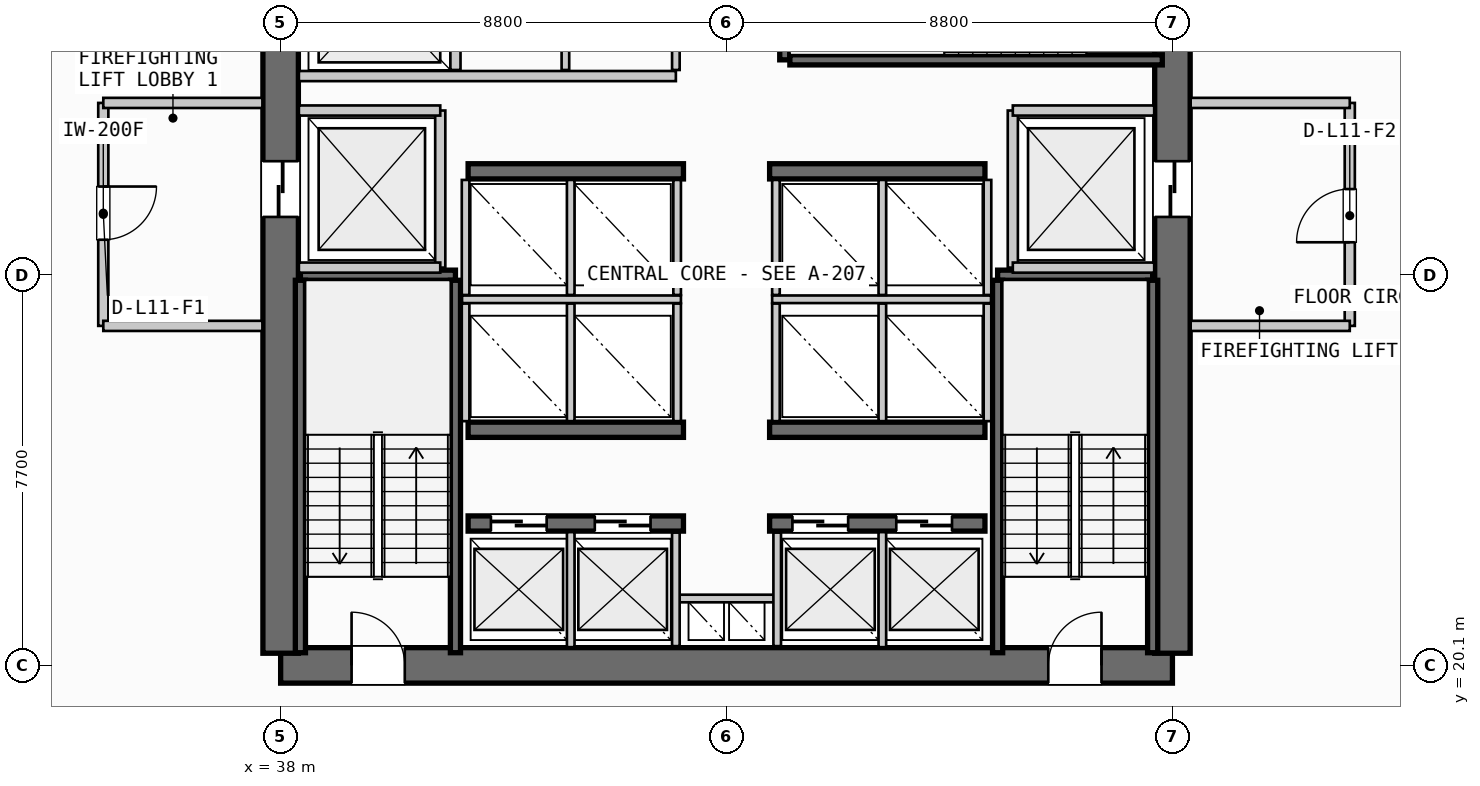
"""IFC4 building model, lengths in metres.
Left out: names, types, materials, properties, quantities, classifications, styles, units other than length and angle.
Written with IfcOpenShell. Run it as: python <this file> out.ifc"""

import sys

from ifc_helpers import new_model, si_unit, direction, frame, frame_2d, origin, place, context, subcontext, project, spatial, rectangle, extrude, source, transform, mapped, element, fill, save


model = new_model("IFC4")
c1 = context("Model", 3, precision=1e-05, world=origin(), true_north=direction((0.0, 1.0)))
c2 = subcontext(c1, "Body", "Model", "MODEL_VIEW")
j1 = project(units=[si_unit("LENGTHUNIT", "METRE"), si_unit("PLANEANGLEUNIT", "RADIAN")], contexts=[c1])
p1 = place(None, origin())
s1 = spatial("IfcSite", under=j1, at=p1, CompositionType="ELEMENT")
p2 = place(p1, origin())
s2 = spatial("IfcBuilding", under=s1, at=p2, CompositionType="ELEMENT")
p3 = place(p2, frame((0.0, 0.0, 48.6)))
s3 = spatial("IfcBuildingStorey", under=s2, at=p3, CompositionType="ELEMENT", Elevation=48.6)
p4 = place(p3, frame((38.0, 20.1, 0.0), z_axis=(0.0, 0.0, 1.0), x_axis=(1.0, 0.0, 0.0)))
e1 = element("IfcWall", 1, at=p4, inside=s3, PredefinedType="SHEAR", context=c2, shape_type="SweptSolid", body=[
    extrude(rectangle(XDim=17.6, YDim=0.7, at=frame_2d((8.8, 0.0))), origin(), (0.0, 0.0, 1.0), 3.55),
])
p5 = place(p4, frame((1.4, 0.0, 0.0)))
e2 = element("IfcOpeningElement", 2, at=p5, cuts=e1, PredefinedType="OPENING", context=c2, shape_type="SweptSolid", body=[
    extrude(rectangle(XDim=1.05, YDim=2.15, at=frame_2d((0.525, 1.075))), frame((0.0, 0.36, 0.0), z_axis=(0.0, -1.0, 0.0), x_axis=(1.0, 0.0, 0.0)), (0.0, 0.0, 1.0), 0.72),
])
p6 = place(p4, frame((15.15, 0.0, 0.0)))
e3 = element("IfcOpeningElement", 3, at=p6, cuts=e1, PredefinedType="OPENING", context=c2, shape_type="SweptSolid", body=[
    extrude(rectangle(XDim=1.05, YDim=2.15, at=frame_2d((0.525, 1.075))), frame((0.0, 0.36, 0.0), z_axis=(0.0, -1.0, 0.0), x_axis=(1.0, 0.0, 0.0)), (0.0, 0.0, 1.0), 0.72),
])
p7 = place(p3, frame((38.0, 35.26, 0.0), z_axis=(0.0, 0.0, 1.0), x_axis=(0.0, -1.0, 0.0)))
e4 = element("IfcWall", 4, at=p7, inside=s3, PredefinedType="SHEAR", context=c2, shape_type="SweptSolid", body=[
    extrude(rectangle(XDim=14.92, YDim=0.7, at=frame_2d((7.46, 0.0))), origin(), (0.0, 0.0, 1.0), 3.55),
])
p8 = place(p7, frame((5.21, 0.0, 0.0)))
e5 = element("IfcOpeningElement", 5, at=p8, cuts=e4, PredefinedType="OPENING", context=c2, shape_type="SweptSolid", body=[
    extrude(rectangle(XDim=1.1, YDim=2.2, at=frame_2d((0.55, 1.1))), frame((0.0, 0.36, 0.0), z_axis=(0.0, -1.0, 0.0), x_axis=(1.0, 0.0, 0.0)), (0.0, 0.0, 1.0), 0.72),
])
p9 = place(p3, frame((55.6, 20.34, 0.0), z_axis=(0.0, 0.0, 1.0), x_axis=(0.0, 1.0, 0.0)))
e6 = element("IfcWall", 6, at=p9, inside=s3, PredefinedType="SHEAR", context=c2, shape_type="SweptSolid", body=[
    extrude(rectangle(XDim=14.92, YDim=0.7, at=frame_2d((7.46, 0.0))), origin(), (0.0, 0.0, 1.0), 3.55),
])
p10 = place(p9, frame((12.71, 0.0, 0.0)))
e7 = element("IfcOpeningElement", 7, at=p10, cuts=e6, PredefinedType="OPENING", context=c2, shape_type="SweptSolid", body=[
    extrude(rectangle(XDim=1.05, YDim=2.15, at=frame_2d((0.525, 1.075))), frame((0.0, 0.36, 0.0), z_axis=(0.0, -1.0, 0.0), x_axis=(1.0, 0.0, 0.0)), (0.0, 0.0, 1.0), 0.72),
])
p11 = place(p9, frame((8.61, 0.0, 0.0)))
e8 = element("IfcOpeningElement", 8, at=p11, cuts=e6, PredefinedType="OPENING", context=c2, shape_type="SweptSolid", body=[
    extrude(rectangle(XDim=1.1, YDim=2.2, at=frame_2d((0.55, 1.1))), frame((0.0, 0.36, 0.0), z_axis=(0.0, -1.0, 0.0), x_axis=(1.0, 0.0, 0.0)), (0.0, 0.0, 1.0), 0.72),
])
p12 = place(p3, frame((41.7, 22.9, 0.0), z_axis=(0.0, 0.0, 1.0), x_axis=(1.0, 0.0, 0.0)))
e9 = element("IfcWall", 9, at=p12, inside=s3, PredefinedType="SHEAR", context=c2, shape_type="SweptSolid", body=[
    extrude(rectangle(XDim=4.25, YDim=0.3, at=frame_2d((2.125, 0.0))), origin(), (0.0, 0.0, 1.0), 3.55),
])
p13 = place(p12, frame((0.45, 0.0, 0.0)))
e10 = element("IfcOpeningElement", 10, at=p13, cuts=e9, PredefinedType="OPENING", context=c2, shape_type="SweptSolid", body=[
    extrude(rectangle(XDim=1.1, YDim=2.2, at=frame_2d((0.55, 1.1))), frame((0.0, 0.16, 0.0), z_axis=(0.0, -1.0, 0.0), x_axis=(1.0, 0.0, 0.0)), (0.0, 0.0, 1.0), 0.32),
])
p14 = place(p12, frame((2.5, 0.0, 0.0)))
e11 = element("IfcOpeningElement", 11, at=p14, cuts=e9, PredefinedType="OPENING", context=c2, shape_type="SweptSolid", body=[
    extrude(rectangle(XDim=1.1, YDim=2.2, at=frame_2d((0.55, 1.1))), frame((0.0, 0.16, 0.0), z_axis=(0.0, -1.0, 0.0), x_axis=(1.0, 0.0, 0.0)), (0.0, 0.0, 1.0), 0.32),
])
p15 = place(p3, frame((47.65, 22.9, 0.0), z_axis=(0.0, 0.0, 1.0), x_axis=(1.0, 0.0, 0.0)))
e12 = element("IfcWall", 12, at=p15, inside=s3, PredefinedType="SHEAR", context=c2, shape_type="SweptSolid", body=[
    extrude(rectangle(XDim=4.25, YDim=0.3, at=frame_2d((2.125, 0.0))), origin(), (0.0, 0.0, 1.0), 3.55),
])
p16 = place(p15, frame((0.45, 0.0, 0.0)))
e13 = element("IfcOpeningElement", 13, at=p16, cuts=e12, PredefinedType="OPENING", context=c2, shape_type="SweptSolid", body=[
    extrude(rectangle(XDim=1.1, YDim=2.2, at=frame_2d((0.55, 1.1))), frame((0.0, 0.16, 0.0), z_axis=(0.0, -1.0, 0.0), x_axis=(1.0, 0.0, 0.0)), (0.0, 0.0, 1.0), 0.32),
])
p17 = place(p15, frame((2.5, 0.0, 0.0)))
e14 = element("IfcOpeningElement", 14, at=p17, cuts=e12, PredefinedType="OPENING", context=c2, shape_type="SweptSolid", body=[
    extrude(rectangle(XDim=1.1, YDim=2.2, at=frame_2d((0.55, 1.1))), frame((0.0, 0.16, 0.0), z_axis=(0.0, -1.0, 0.0), x_axis=(1.0, 0.0, 0.0)), (0.0, 0.0, 1.0), 0.32),
])
for number, where, z_axis, x_axis in (
    (15, (41.7, 24.75, 0.0), (0.0, 0.0, 1.0), (1.0, 0.0, 0.0)),
    (16, (47.65, 24.75, 0.0), (0.0, 0.0, 1.0), (1.0, 0.0, 0.0)),
    (17, (41.7, 29.85, 0.0), (0.0, 0.0, 1.0), (1.0, 0.0, 0.0)),
    (18, (47.65, 29.85, 0.0), (0.0, 0.0, 1.0), (1.0, 0.0, 0.0)),
):
    element("IfcWall", number, at=place(p3, frame(where, z_axis=z_axis, x_axis=x_axis)), inside=s3, PredefinedType="SHEAR", context=c2, shape_type="SweptSolid", body=[
        extrude(rectangle(XDim=4.25, YDim=0.3, at=frame_2d((2.125, 0.0))), origin(), (0.0, 0.0, 1.0), 3.55),
    ])
p18 = place(p3, frame((38.39, 27.8, 0.0), z_axis=(0.0, 0.0, 1.0), x_axis=(1.0, 0.0, 0.0)))
e19 = element("IfcWall", 19, at=p18, inside=s3, PredefinedType="SHEAR", context=c2, shape_type="SweptSolid", body=[
    extrude(rectangle(XDim=3.06, YDim=0.2, at=frame_2d((1.53, 0.0))), origin(), (0.0, 0.0, 1.0), 3.55),
])
for number, where, z_axis, x_axis in (
    (20, (41.45, 27.7, 0.0), (0.0, 0.0, 1.0), (0.0, -1.0, 0.0)),
    (21, (38.39, 20.35, 0.0), (0.0, 0.0, 1.0), (0.0, 1.0, 0.0)),
):
    element("IfcWall", number, at=place(p3, frame(where, z_axis=z_axis, x_axis=x_axis)), inside=s3, PredefinedType="SHEAR", context=c2, shape_type="SweptSolid", body=[
        extrude(rectangle(XDim=7.35, YDim=0.2, at=frame_2d((3.675, 0.0))), origin(), (0.0, 0.0, 1.0), 3.55),
    ])
p19 = place(p3, frame((52.15, 27.8, 0.0), z_axis=(0.0, 0.0, 1.0), x_axis=(1.0, 0.0, 0.0)))
e22 = element("IfcWall", 22, at=p19, inside=s3, PredefinedType="SHEAR", context=c2, shape_type="SweptSolid", body=[
    extrude(rectangle(XDim=3.06, YDim=0.2, at=frame_2d((1.53, 0.0))), origin(), (0.0, 0.0, 1.0), 3.55),
])
for number, where, z_axis, x_axis in (
    (23, (55.21, 27.7, 0.0), (0.0, 0.0, 1.0), (0.0, -1.0, 0.0)),
    (24, (52.15, 20.35, 0.0), (0.0, 0.0, 1.0), (0.0, 1.0, 0.0)),
):
    element("IfcWall", number, at=place(p3, frame(where, z_axis=z_axis, x_axis=x_axis)), inside=s3, PredefinedType="SHEAR", context=c2, shape_type="SweptSolid", body=[
        extrude(rectangle(XDim=7.35, YDim=0.2, at=frame_2d((3.675, 0.0))), origin(), (0.0, 0.0, 1.0), 3.55),
    ])
p20 = place(p3, frame((47.95, 32.05, 0.0), z_axis=(0.0, 0.0, 1.0), x_axis=(0.0, 1.0, 0.0)))
e25 = element("IfcWall", 25, at=p20, inside=s3, PredefinedType="SHEAR", context=c2, shape_type="SweptSolid", body=[
    extrude(rectangle(XDim=3.06, YDim=0.2, at=frame_2d((1.53, 0.0))), origin(), (0.0, 0.0, 1.0), 3.55),
])
p21 = place(p3, frame((55.4, 32.05, 0.0), z_axis=(0.0, 0.0, 1.0), x_axis=(-1.0, 0.0, 0.0)))
e26 = element("IfcWall", 26, at=p21, inside=s3, PredefinedType="SHEAR", context=c2, shape_type="SweptSolid", body=[
    extrude(rectangle(XDim=7.35, YDim=0.2, at=frame_2d((3.675, 0.0))), origin(), (0.0, 0.0, 1.0), 3.55),
])
p22 = place(p3, frame((45.8, 21.42, 0.0), z_axis=(0.0, 0.0, 1.0), x_axis=(1.0, 0.0, 0.0)))
e27 = element("IfcWall", 27, at=p22, inside=s3, PredefinedType="PARTITIONING", context=c2, shape_type="SweptSolid", body=[
    extrude(rectangle(XDim=2.0, YDim=0.15, at=frame_2d((1.0, 0.0))), origin(), (0.0, 0.0, 1.0), 2.785),
])
for number, where, z_axis, x_axis in (
    (28, (45.8, 20.48, 0.0), (0.0, 0.0, 1.0), (0.0, 1.0, 0.0)),
    (29, (47.8, 20.48, 0.0), (0.0, 0.0, 1.0), (0.0, 1.0, 0.0)),
):
    element("IfcWall", number, at=place(p3, frame(where, z_axis=z_axis, x_axis=x_axis)), inside=s3, PredefinedType="PARTITIONING", context=c2, shape_type="SweptSolid", body=[
        extrude(rectangle(XDim=2.24, YDim=0.15, at=frame_2d((1.12, 0.0))), origin(), (0.0, 0.0, 1.0), 2.785),
    ])
p23 = place(p3, frame((41.15, 27.95, 0.0), z_axis=(0.0, 0.0, 1.0), x_axis=(0.0, 1.0, 0.0)))
e30 = element("IfcWall", 30, at=p23, inside=s3, PredefinedType="PARTITIONING", context=c2, shape_type="SweptSolid", body=[
    extrude(rectangle(XDim=3.1, YDim=0.2, at=frame_2d((1.55, 0.0))), origin(), (0.0, 0.0, 1.0), 2.785),
])
for number, where, z_axis, x_axis in (
    (31, (38.36, 27.95, 0.0), (0.0, 0.0, 1.0), (1.0, 0.0, 0.0)),
    (32, (38.36, 31.05, 0.0), (0.0, 0.0, 1.0), (1.0, 0.0, 0.0)),
):
    element("IfcWall", number, at=place(p3, frame(where, z_axis=z_axis, x_axis=x_axis)), inside=s3, PredefinedType="PARTITIONING", context=c2, shape_type="SweptSolid", body=[
        extrude(rectangle(XDim=2.79, YDim=0.2, at=frame_2d((1.395, 0.0))), origin(), (0.0, 0.0, 1.0), 2.785),
    ])
p24 = place(p3, frame((34.5, 31.2, 0.0), z_axis=(0.0, 0.0, 1.0), x_axis=(0.0, -1.0, 0.0)))
e33 = element("IfcWall", 33, at=p24, inside=s3, PredefinedType="PARTITIONING", context=c2, shape_type="SweptSolid", body=[
    extrude(rectangle(XDim=4.4, YDim=0.2, at=frame_2d((2.2, 0.0))), origin(), (0.0, 0.0, 1.0), 2.785),
])
p25 = place(p24, frame((1.65, 0.0, 0.0)))
e34 = element("IfcOpeningElement", 34, at=p25, cuts=e33, PredefinedType="OPENING", context=c2, shape_type="SweptSolid", body=[
    extrude(rectangle(XDim=1.05, YDim=2.15, at=frame_2d((0.525, 1.075))), frame((0.0, 0.11, 0.0), z_axis=(0.0, -1.0, 0.0), x_axis=(1.0, 0.0, 0.0)), (0.0, 0.0, 1.0), 0.22),
])
for number, where, z_axis, x_axis in (
    (35, (34.5, 26.8, 0.0), (0.0, 0.0, 1.0), (1.0, 0.0, 0.0)),
    (36, (34.5, 31.2, 0.0), (0.0, 0.0, 1.0), (1.0, 0.0, 0.0)),
):
    element("IfcWall", number, at=place(p3, frame(where, z_axis=z_axis, x_axis=x_axis)), inside=s3, PredefinedType="PARTITIONING", context=c2, shape_type="SweptSolid", body=[
        extrude(rectangle(XDim=3.14, YDim=0.2, at=frame_2d((1.57, 0.0))), origin(), (0.0, 0.0, 1.0), 2.785),
    ])
p26 = place(p3, frame((52.45, 27.95, 0.0), z_axis=(0.0, 0.0, 1.0), x_axis=(0.0, 1.0, 0.0)))
e37 = element("IfcWall", 37, at=p26, inside=s3, PredefinedType="PARTITIONING", context=c2, shape_type="SweptSolid", body=[
    extrude(rectangle(XDim=3.1, YDim=0.2, at=frame_2d((1.55, 0.0))), origin(), (0.0, 0.0, 1.0), 2.785),
])
for number, where, z_axis, x_axis in (
    (38, (52.45, 27.95, 0.0), (0.0, 0.0, 1.0), (1.0, 0.0, 0.0)),
    (39, (52.45, 31.05, 0.0), (0.0, 0.0, 1.0), (1.0, 0.0, 0.0)),
):
    element("IfcWall", number, at=place(p3, frame(where, z_axis=z_axis, x_axis=x_axis)), inside=s3, PredefinedType="PARTITIONING", context=c2, shape_type="SweptSolid", body=[
        extrude(rectangle(XDim=2.79, YDim=0.2, at=frame_2d((1.395, 0.0))), origin(), (0.0, 0.0, 1.0), 2.785),
    ])
p27 = place(p3, frame((59.1, 26.8, 0.0), z_axis=(0.0, 0.0, 1.0), x_axis=(0.0, 1.0, 0.0)))
e40 = element("IfcWall", 40, at=p27, inside=s3, PredefinedType="PARTITIONING", context=c2, shape_type="SweptSolid", body=[
    extrude(rectangle(XDim=4.4, YDim=0.2, at=frame_2d((2.2, 0.0))), origin(), (0.0, 0.0, 1.0), 2.785),
])
p28 = place(p27, frame((1.65, 0.0, 0.0)))
e41 = element("IfcOpeningElement", 41, at=p28, cuts=e40, PredefinedType="OPENING", context=c2, shape_type="SweptSolid", body=[
    extrude(rectangle(XDim=1.05, YDim=2.15, at=frame_2d((0.525, 1.075))), frame((0.0, 0.11, 0.0), z_axis=(0.0, -1.0, 0.0), x_axis=(1.0, 0.0, 0.0)), (0.0, 0.0, 1.0), 0.22),
])
for number, where, z_axis, x_axis in (
    (42, (55.96, 26.8, 0.0), (0.0, 0.0, 1.0), (1.0, 0.0, 0.0)),
    (43, (55.96, 31.2, 0.0), (0.0, 0.0, 1.0), (1.0, 0.0, 0.0)),
):
    element("IfcWall", number, at=place(p3, frame(where, z_axis=z_axis, x_axis=x_axis)), inside=s3, PredefinedType="PARTITIONING", context=c2, shape_type="SweptSolid", body=[
        extrude(rectangle(XDim=3.14, YDim=0.2, at=frame_2d((1.57, 0.0))), origin(), (0.0, 0.0, 1.0), 2.785),
    ])
for number, where, z_axis, x_axis in (
    (44, (43.725, 20.46, 0.0), (0.0, 0.0, 1.0), (0.0, 1.0, 0.0)),
    (45, (49.875, 20.46, 0.0), (0.0, 0.0, 1.0), (0.0, 1.0, 0.0)),
):
    element("IfcWall", number, at=place(p3, frame(where, z_axis=z_axis, x_axis=x_axis)), inside=s3, PredefinedType="PARTITIONING", context=c2, shape_type="SweptSolid", body=[
        extrude(rectangle(XDim=2.27, YDim=0.15, at=frame_2d((1.135, 0.0))), origin(), (0.0, 0.0, 1.0), 2.785),
    ])
p29 = place(p3, frame((41.58, 27.325, 0.0), z_axis=(0.0, 0.0, 1.0), x_axis=(1.0, 0.0, 0.0)))
e46 = element("IfcWall", 46, at=p29, inside=s3, PredefinedType="PARTITIONING", context=c2, shape_type="SweptSolid", body=[
    extrude(rectangle(XDim=4.32, YDim=0.15, at=frame_2d((2.16, 0.0))), origin(), (0.0, 0.0, 1.0), 2.785),
])
p30 = place(p3, frame((47.7, 27.325, 0.0), z_axis=(0.0, 0.0, 1.0), x_axis=(1.0, 0.0, 0.0)))
e47 = element("IfcWall", 47, at=p30, inside=s3, PredefinedType="PARTITIONING", context=c2, shape_type="SweptSolid", body=[
    extrude(rectangle(XDim=4.32, YDim=0.15, at=frame_2d((2.16, 0.0))), origin(), (0.0, 0.0, 1.0), 2.785),
])
for number, where, z_axis, x_axis in (
    (48, (41.65, 24.92, 0.0), (0.0, 0.0, 1.0), (0.0, 1.0, 0.0)),
    (49, (43.725, 24.92, 0.0), (0.0, 0.0, 1.0), (0.0, 1.0, 0.0)),
    (50, (45.825, 24.92, 0.0), (0.0, 0.0, 1.0), (0.0, 1.0, 0.0)),
    (51, (47.775, 24.92, 0.0), (0.0, 0.0, 1.0), (0.0, 1.0, 0.0)),
    (52, (49.875, 24.92, 0.0), (0.0, 0.0, 1.0), (0.0, 1.0, 0.0)),
    (53, (51.95, 24.92, 0.0), (0.0, 0.0, 1.0), (0.0, 1.0, 0.0)),
):
    element("IfcWall", number, at=place(p3, frame(where, z_axis=z_axis, x_axis=x_axis)), inside=s3, PredefinedType="PARTITIONING", context=c2, shape_type="SweptSolid", body=[
        extrude(rectangle(XDim=2.32, YDim=0.15, at=frame_2d((1.16, 0.0))), origin(), (0.0, 0.0, 1.0), 2.785),
    ])
for number, where, z_axis, x_axis in (
    (54, (41.65, 27.41, 0.0), (0.0, 0.0, 1.0), (0.0, 1.0, 0.0)),
    (55, (43.725, 27.41, 0.0), (0.0, 0.0, 1.0), (0.0, 1.0, 0.0)),
    (56, (45.825, 27.41, 0.0), (0.0, 0.0, 1.0), (0.0, 1.0, 0.0)),
    (57, (47.775, 27.41, 0.0), (0.0, 0.0, 1.0), (0.0, 1.0, 0.0)),
    (58, (49.875, 27.41, 0.0), (0.0, 0.0, 1.0), (0.0, 1.0, 0.0)),
    (59, (51.95, 27.41, 0.0), (0.0, 0.0, 1.0), (0.0, 1.0, 0.0)),
):
    element("IfcWall", number, at=place(p3, frame(where, z_axis=z_axis, x_axis=x_axis)), inside=s3, PredefinedType="PARTITIONING", context=c2, shape_type="SweptSolid", body=[
        extrude(rectangle(XDim=2.27, YDim=0.15, at=frame_2d((1.135, 0.0))), origin(), (0.0, 0.0, 1.0), 2.785),
    ])
p31 = place(p3, frame((41.45, 31.85, 0.0), z_axis=(0.0, 0.0, 1.0), x_axis=(0.0, 1.0, 0.0)))
e60 = element("IfcWall", 60, at=p31, inside=s3, PredefinedType="PARTITIONING", context=c2, shape_type="SweptSolid", body=[
    extrude(rectangle(XDim=3.29, YDim=0.2, at=frame_2d((1.645, 0.0))), origin(), (0.0, 0.0, 1.0), 2.785),
])
p32 = place(p3, frame((38.36, 31.73, 0.0), z_axis=(0.0, 0.0, 1.0), x_axis=(1.0, 0.0, 0.0)))
e61 = element("IfcWall", 61, at=p32, inside=s3, PredefinedType="PARTITIONING", context=c2, shape_type="SweptSolid", body=[
    extrude(rectangle(XDim=7.44, YDim=0.2, at=frame_2d((3.72, 0.0))), origin(), (0.0, 0.0, 1.0), 2.785),
])
p33 = place(p3, frame((45.8, 31.85, 0.0), z_axis=(0.0, 0.0, 1.0), x_axis=(0.0, 1.0, 0.0)))
e62 = element("IfcWall", 62, at=p33, inside=s3, PredefinedType="PARTITIONING", context=c2, shape_type="SweptSolid", body=[
    extrude(rectangle(XDim=3.29, YDim=0.15, at=frame_2d((1.645, 0.0))), origin(), (0.0, 0.0, 1.0), 2.785),
])
p34 = place(p3, frame((43.62, 31.85, 0.0), z_axis=(0.0, 0.0, 1.0), x_axis=(0.0, 1.0, 0.0)))
e63 = element("IfcWall", 63, at=p34, inside=s3, PredefinedType="PLUMBINGWALL", context=c2, shape_type="SweptSolid", body=[
    extrude(rectangle(XDim=3.29, YDim=0.15, at=frame_2d((1.645, 0.0))), origin(), (0.0, 0.0, 1.0), 2.785),
])
m1 = source(origin(), c2, "Body", "SweptSolid", [
    extrude(rectangle(XDim=1.05, YDim=2.15, at=frame_2d((0.525, 1.075))), frame((0.0, 0.025, 0.0), z_axis=(0.0, -1.0, 0.0), x_axis=(1.0, 0.0, 0.0)), (0.0, 0.0, 1.0), 0.05),
])
p35 = place(p5, origin())
e64 = element("IfcDoor", 64, at=p35, inside=s3, OperationType="SINGLE_SWING_LEFT", PredefinedType="DOOR", context=c2, shape_type="MappedRepresentation", body=[
    mapped(m1, transform((0.0, 0.0, 0.0), scale=1.0)),
])
fill(e2, e64)
p36 = place(p6, origin())
e65 = element("IfcDoor", 65, at=p36, inside=s3, OperationType="SINGLE_SWING_RIGHT", PredefinedType="DOOR", context=c2, shape_type="MappedRepresentation", body=[
    mapped(m1, transform((0.0, 0.0, 0.0), scale=1.0)),
])
fill(e3, e65)
m2 = source(origin(), c2, "Body", "SweptSolid", [
    extrude(rectangle(XDim=1.1, YDim=2.2, at=frame_2d((0.55, 1.1))), frame((0.0, 0.025, 0.0), z_axis=(0.0, -1.0, 0.0), x_axis=(1.0, 0.0, 0.0)), (0.0, 0.0, 1.0), 0.05),
])
p37 = place(p8, origin())
e66 = element("IfcDoor", 66, at=p37, inside=s3, OperationType="SLIDING_TO_LEFT", PredefinedType="DOOR", context=c2, shape_type="MappedRepresentation", body=[
    mapped(m2, transform((0.0, 0.0, 0.0), scale=1.0)),
])
fill(e5, e66)
p38 = place(p11, origin())
e67 = element("IfcDoor", 67, at=p38, inside=s3, OperationType="SLIDING_TO_RIGHT", PredefinedType="DOOR", context=c2, shape_type="MappedRepresentation", body=[
    mapped(m2, transform((0.0, 0.0, 0.0), scale=1.0)),
])
fill(e8, e67)
p39 = place(p13, origin())
e68 = element("IfcDoor", 68, at=p39, inside=s3, OperationType="SLIDING_TO_LEFT", PredefinedType="DOOR", context=c2, shape_type="MappedRepresentation", body=[
    mapped(m2, transform((0.0, 0.0, 0.0), scale=1.0)),
])
fill(e10, e68)
p40 = place(p14, origin())
e69 = element("IfcDoor", 69, at=p40, inside=s3, OperationType="SLIDING_TO_LEFT", PredefinedType="DOOR", context=c2, shape_type="MappedRepresentation", body=[
    mapped(m2, transform((0.0, 0.0, 0.0), scale=1.0)),
])
fill(e11, e69)
p41 = place(p16, origin())
e70 = element("IfcDoor", 70, at=p41, inside=s3, OperationType="SLIDING_TO_LEFT", PredefinedType="DOOR", context=c2, shape_type="MappedRepresentation", body=[
    mapped(m2, transform((0.0, 0.0, 0.0), scale=1.0)),
])
fill(e13, e70)
p42 = place(p17, origin())
e71 = element("IfcDoor", 71, at=p42, inside=s3, OperationType="SLIDING_TO_LEFT", PredefinedType="DOOR", context=c2, shape_type="MappedRepresentation", body=[
    mapped(m2, transform((0.0, 0.0, 0.0), scale=1.0)),
])
fill(e14, e71)
p43 = place(p25, origin())
e72 = element("IfcDoor", 72, at=p43, inside=s3, OperationType="SINGLE_SWING_LEFT", PredefinedType="DOOR", context=c2, shape_type="MappedRepresentation", body=[
    mapped(m1, transform((0.0, 0.0, 0.0), scale=1.0)),
])
fill(e34, e72)
p44 = place(p28, origin())
e73 = element("IfcDoor", 73, at=p44, inside=s3, OperationType="SINGLE_SWING_LEFT", PredefinedType="DOOR", context=c2, shape_type="MappedRepresentation", body=[
    mapped(m1, transform((0.0, 0.0, 0.0), scale=1.0)),
])
fill(e41, e73)
save(model, sys.argv[1])
